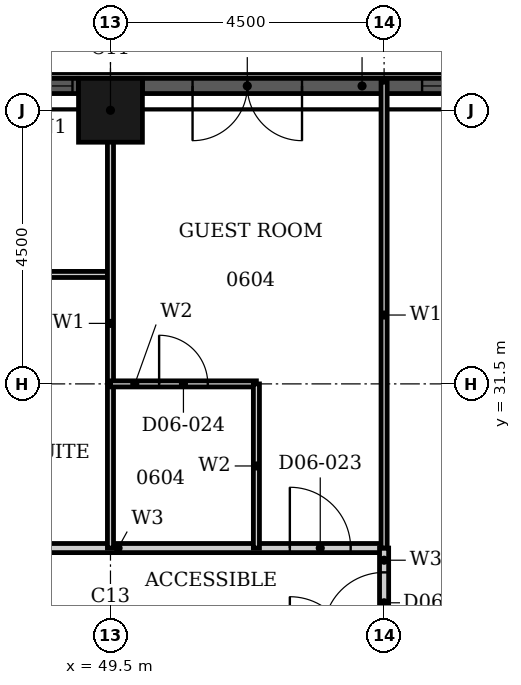
"""IFC4 building model, lengths in metres.
Left out: names, types, materials, properties, quantities, classifications, styles, units other than length and angle.
Written with IfcOpenShell. Run it as: python <this file> out.ifc"""

import sys

from ifc_helpers import new_model, si_unit, direction, frame, frame_2d, origin, origin_2d, place, context, subcontext, project, spatial, rectangle, hollow_rectangle, extrude, element, fill, save


model = new_model("IFC4")
c1 = context("Model", 3, precision=1e-05, world=origin(), true_north=direction((0.0, 1.0)))
c2 = subcontext(c1, "Body", "Model", "MODEL_VIEW")
j1 = project(units=[si_unit("LENGTHUNIT", "METRE"), si_unit("PLANEANGLEUNIT", "RADIAN")], contexts=[c1])
p1 = place(None, origin())
s1 = spatial("IfcSite", under=j1, at=p1, CompositionType="ELEMENT")
p2 = place(p1, origin())
s2 = spatial("IfcBuilding", under=s1, at=p2, CompositionType="ELEMENT")
p3 = place(p2, frame((0.0, 0.0, 33.6)))
s3 = spatial("IfcBuildingStorey", under=s2, at=p3, CompositionType="ELEMENT", Elevation=33.6)
p4 = place(p3, frame((49.5, 36.0, 0.0), z_axis=(0.0, 0.0, 1.0), x_axis=(1.0, 0.0, 0.0)))
e1 = element("IfcColumn", 1, at=p4, inside=s3, PredefinedType="COLUMN", context=c2, shape_type="SweptSolid", body=[
    extrude(hollow_rectangle(XDim=1.05, YDim=1.05, WallThickness=0.034, at=origin_2d()), origin(), (0.0, 0.0, 1.0), 3.6),
])
p5 = place(p3, frame((57.975, 36.4, 0.0), z_axis=(0.0, 0.0, 1.0), x_axis=(-1.0, 0.0, 0.0)))
e2 = element("IfcWall", 2, at=p5, inside=s3, PredefinedType="SOLIDWALL", context=c2, shape_type="SweptSolid", body=[
    extrude(rectangle(XDim=7.95, YDim=0.25, at=frame_2d((3.975, 0.0))), origin(), (0.0, 0.0, 1.0), 3.6),
])
p6 = place(p5, frame((0.1, 0.0, 0.9)))
e3 = element("IfcOpeningElement", 3, at=p6, cuts=e2, PredefinedType="OPENING", context=c2, shape_type="SweptSolid", body=[
    extrude(rectangle(XDim=3.25, YDim=2.08, at=frame_2d((1.625, 1.04))), frame((0.0, 0.135, 0.0), z_axis=(0.0, -1.0, 0.0), x_axis=(1.0, 0.0, 0.0)), (0.0, 0.0, 1.0), 0.27),
])
p7 = place(p5, frame((5.325, 0.0, 0.0)))
e4 = element("IfcOpeningElement", 4, at=p7, cuts=e2, PredefinedType="OPENING", context=c2, shape_type="SweptSolid", body=[
    extrude(rectangle(XDim=1.8, YDim=2.4, at=frame_2d((0.9, 1.2))), frame((0.0, 0.135, 0.0), z_axis=(0.0, -1.0, 0.0), x_axis=(1.0, 0.0, 0.0)), (0.0, 0.0, 1.0), 0.27),
])
p8 = place(p3, frame((48.975, 36.4, 0.0), z_axis=(0.0, 0.0, 1.0), x_axis=(-1.0, 0.0, 0.0)))
e5 = element("IfcWall", 5, at=p8, inside=s3, PredefinedType="SOLIDWALL", context=c2, shape_type="SweptSolid", body=[
    extrude(rectangle(XDim=1.2, YDim=0.25, at=frame_2d((0.6, 0.0))), origin(), (0.0, 0.0, 1.0), 3.6),
])
p9 = place(p8, frame((0.1, 0.0, 0.9)))
e6 = element("IfcOpeningElement", 6, at=p9, cuts=e5, PredefinedType="OPENING", context=c2, shape_type="SweptSolid", body=[
    extrude(rectangle(XDim=1.0, YDim=2.08, at=frame_2d((0.5, 1.04))), frame((0.0, 0.135, 0.0), z_axis=(0.0, -1.0, 0.0), x_axis=(1.0, 0.0, 0.0)), (0.0, 0.0, 1.0), 0.27),
])
p10 = place(p3, frame((46.8, 28.8, 0.0), z_axis=(0.0, 0.0, 1.0), x_axis=(1.0, 0.0, 0.0)))
e7 = element("IfcWall", 7, at=p10, inside=s3, PredefinedType="PARTITIONING", context=c2, shape_type="SweptSolid", body=[
    extrude(rectangle(XDim=7.2, YDim=0.15, at=frame_2d((3.6, 0.0))), origin(), (0.0, 0.0, 1.0), 3.3),
])
p11 = place(p10, frame((5.65, 0.0, 0.0)))
e8 = element("IfcOpeningElement", 8, at=p11, cuts=e7, PredefinedType="OPENING", context=c2, shape_type="SweptSolid", body=[
    extrude(rectangle(XDim=1.0, YDim=2.1, at=frame_2d((0.5, 1.05))), frame((0.0, 0.085, 0.0), z_axis=(0.0, -1.0, 0.0), x_axis=(1.0, 0.0, 0.0)), (0.0, 0.0, 1.0), 0.17),
])
p12 = place(p3, frame((54.0, 27.0, 0.0), z_axis=(0.0, 0.0, 1.0), x_axis=(0.0, 1.0, 0.0)))
e9 = element("IfcWall", 9, at=p12, inside=s3, PredefinedType="PARTITIONING", context=c2, shape_type="SweptSolid", body=[
    extrude(rectangle(XDim=1.8, YDim=0.15, at=frame_2d((0.9, 0.0))), origin(), (0.0, 0.0, 1.0), 3.3),
])
p13 = place(p12, frame((0.4, 0.0, 0.0)))
e10 = element("IfcOpeningElement", 10, at=p13, cuts=e9, PredefinedType="OPENING", context=c2, shape_type="SweptSolid", body=[
    extrude(rectangle(XDim=1.0, YDim=2.1, at=frame_2d((0.5, 1.05))), frame((0.0, 0.085, 0.0), z_axis=(0.0, -1.0, 0.0), x_axis=(1.0, 0.0, 0.0)), (0.0, 0.0, 1.0), 0.17),
])
p14 = place(p3, frame((46.8, 33.3, 0.0), z_axis=(0.0, 0.0, 1.0), x_axis=(1.0, 0.0, 0.0)))
e11 = element("IfcWall", 11, at=p14, inside=s3, PredefinedType="PARTITIONING", context=c2, shape_type="SweptSolid", body=[
    extrude(rectangle(XDim=2.7, YDim=0.1, at=frame_2d((1.35, 0.0))), origin(), (0.0, 0.0, 1.0), 3.3),
])
p15 = place(p3, frame((49.5, 28.8, 0.0), z_axis=(0.0, 0.0, 1.0), x_axis=(0.0, 1.0, 0.0)))
e12 = element("IfcWall", 12, at=p15, inside=s3, PredefinedType="PARTITIONING", context=c2, shape_type="SweptSolid", body=[
    extrude(rectangle(XDim=7.39, YDim=0.1, at=frame_2d((3.695, 0.0))), origin(), (0.0, 0.0, 1.0), 2.38),
])
p16 = place(p3, frame((54.0, 28.8, 0.0), z_axis=(0.0, 0.0, 1.0), x_axis=(0.0, 1.0, 0.0)))
e13 = element("IfcWall", 13, at=p16, inside=s3, PredefinedType="PARTITIONING", context=c2, shape_type="SweptSolid", body=[
    extrude(rectangle(XDim=7.665, YDim=0.1, at=frame_2d((3.833, 0.0))), origin(), (0.0, 0.0, 1.0), 3.3),
])
p17 = place(p3, frame((49.5, 31.5, 0.0), z_axis=(0.0, 0.0, 1.0), x_axis=(1.0, 0.0, 0.0)))
e14 = element("IfcWall", 14, at=p17, inside=s3, PredefinedType="PARTITIONING", context=c2, shape_type="SweptSolid", body=[
    extrude(rectangle(XDim=2.4, YDim=0.1, at=frame_2d((1.2, 0.0))), origin(), (0.0, 0.0, 1.0), 2.58),
])
p18 = place(p17, frame((0.8, 0.0, 0.0)))
e15 = element("IfcOpeningElement", 15, at=p18, cuts=e14, PredefinedType="OPENING", context=c2, shape_type="SweptSolid", body=[
    extrude(rectangle(XDim=0.8, YDim=2.1, at=frame_2d((0.4, 1.05))), frame((0.0, 0.06, 0.0), z_axis=(0.0, -1.0, 0.0), x_axis=(1.0, 0.0, 0.0)), (0.0, 0.0, 1.0), 0.12),
])
p19 = place(p3, frame((51.9, 28.8, 0.0), z_axis=(0.0, 0.0, 1.0), x_axis=(0.0, 1.0, 0.0)))
e16 = element("IfcWall", 16, at=p19, inside=s3, PredefinedType="PARTITIONING", context=c2, shape_type="SweptSolid", body=[
    extrude(rectangle(XDim=2.7, YDim=0.1, at=frame_2d((1.35, 0.0))), origin(), (0.0, 0.0, 1.0), 3.3),
])
p20 = place(p6, origin())
e17 = element("IfcWindow", 17, at=p20, inside=s3, PartitioningType="SINGLE_PANEL", PredefinedType="WINDOW", context=c2, shape_type="SweptSolid", body=[
    extrude(rectangle(XDim=3.25, YDim=2.08, at=frame_2d((1.625, 1.04))), frame((0.0, 0.03, 0.0), z_axis=(0.0, -1.0, 0.0), x_axis=(1.0, 0.0, 0.0)), (0.0, 0.0, 1.0), 0.06),
])
fill(e3, e17)
p21 = place(p7, origin())
e18 = element("IfcDoor", 18, at=p21, inside=s3, OperationType="DOUBLE_DOOR_SINGLE_SWING", PredefinedType="DOOR", context=c2, shape_type="SweptSolid", body=[
    extrude(rectangle(XDim=1.8, YDim=2.4, at=frame_2d((0.9, 1.2))), frame((0.0, 0.025, 0.0), z_axis=(0.0, -1.0, 0.0), x_axis=(1.0, 0.0, 0.0)), (0.0, 0.0, 1.0), 0.05),
])
fill(e4, e18)
p22 = place(p9, origin())
e19 = element("IfcWindow", 19, at=p22, inside=s3, PartitioningType="SINGLE_PANEL", PredefinedType="WINDOW", context=c2, shape_type="SweptSolid", body=[
    extrude(rectangle(XDim=1.0, YDim=2.08, at=frame_2d((0.5, 1.04))), frame((0.0, 0.03, 0.0), z_axis=(0.0, -1.0, 0.0), x_axis=(1.0, 0.0, 0.0)), (0.0, 0.0, 1.0), 0.06),
])
fill(e6, e19)
p23 = place(p11, origin())
e20 = element("IfcDoor", 20, at=p23, inside=s3, OperationType="SINGLE_SWING_RIGHT", PredefinedType="DOOR", context=c2, shape_type="SweptSolid", body=[
    extrude(rectangle(XDim=1.0, YDim=2.1, at=frame_2d((0.5, 1.05))), frame((0.0, 0.025, 0.0), z_axis=(0.0, -1.0, 0.0), x_axis=(1.0, 0.0, 0.0)), (0.0, 0.0, 1.0), 0.05),
])
fill(e8, e20)
p24 = place(p18, origin())
e21 = element("IfcDoor", 21, at=p24, inside=s3, OperationType="SINGLE_SWING_RIGHT", PredefinedType="DOOR", context=c2, shape_type="SweptSolid", body=[
    extrude(rectangle(XDim=0.8, YDim=2.1, at=frame_2d((0.4, 1.05))), frame((0.0, 0.025, 0.0), z_axis=(0.0, -1.0, 0.0), x_axis=(1.0, 0.0, 0.0)), (0.0, 0.0, 1.0), 0.05),
])
fill(e15, e21)
p25 = place(p13, origin())
e22 = element("IfcDoor", 22, at=p25, inside=s3, OperationType="SINGLE_SWING_LEFT", PredefinedType="DOOR", context=c2, shape_type="SweptSolid", body=[
    extrude(rectangle(XDim=1.0, YDim=2.1, at=frame_2d((0.5, 1.05))), frame((0.0, 0.025, 0.0), z_axis=(0.0, -1.0, 0.0), x_axis=(1.0, 0.0, 0.0)), (0.0, 0.0, 1.0), 0.05),
])
fill(e10, e22)
save(model, sys.argv[1])
